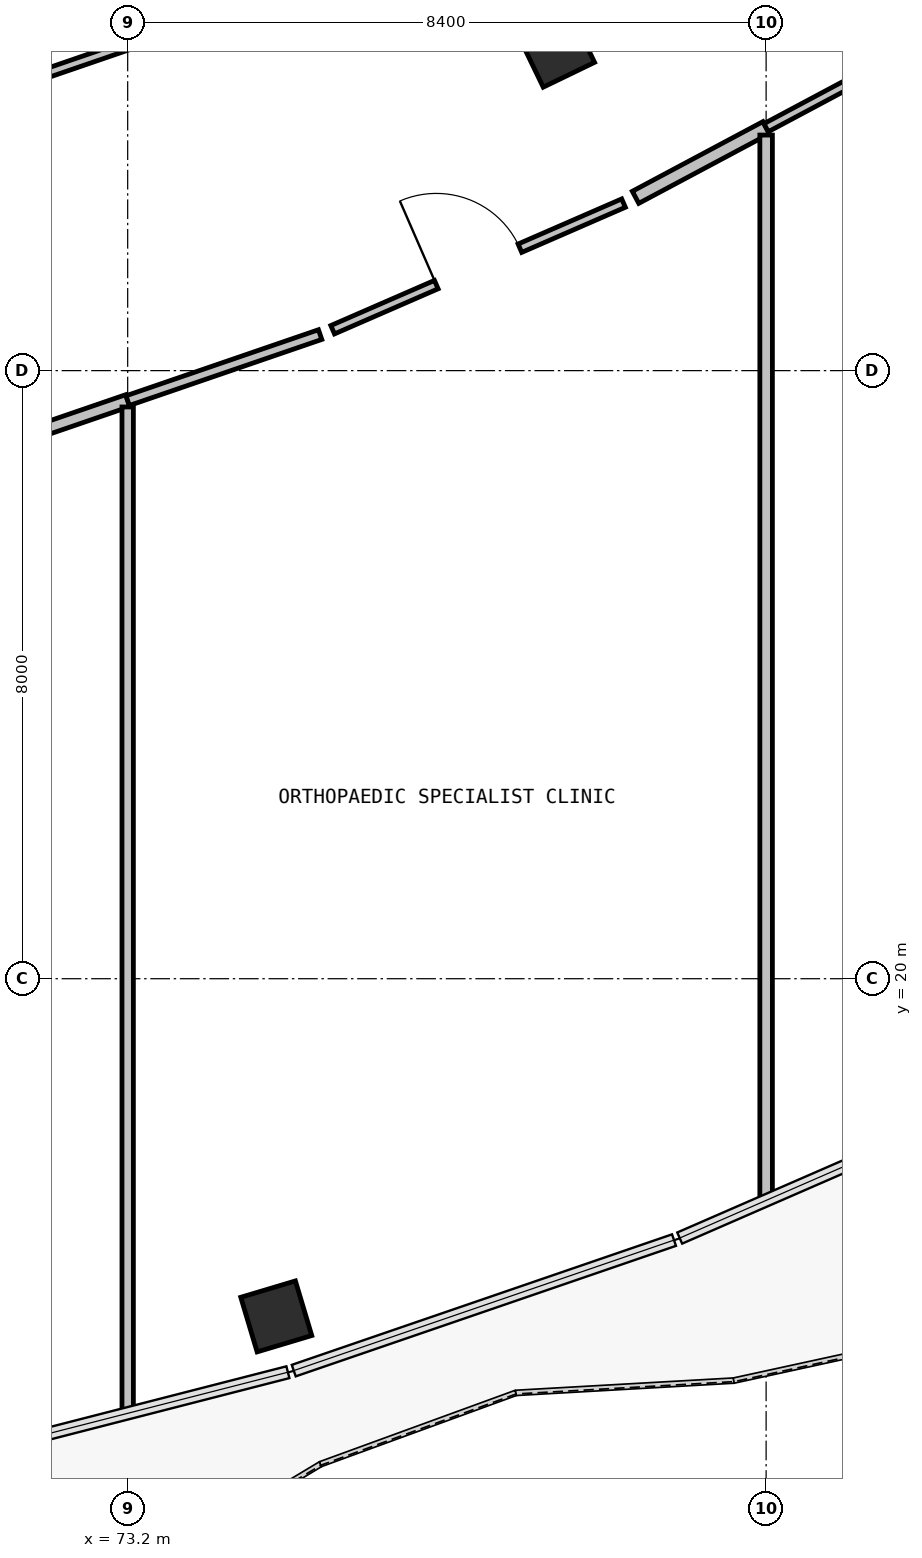
"""IFC4 building model, lengths in metres.
Left out: names, types, materials, properties, quantities, classifications, styles, units other than length and angle.
Written with IfcOpenShell. Run it as: python <this file> out.ifc"""

import sys

from ifc_helpers import new_model, si_unit, direction, frame, frame_2d, origin, origin_2d, place, context, subcontext, project, spatial, rectangle, extrude, element, fill, save


model = new_model("IFC4")
c1 = context("Model", 3, precision=1e-05, world=origin(), true_north=direction((0.0, 1.0)))
c2 = subcontext(c1, "Body", "Model", "MODEL_VIEW")
j1 = project(units=[si_unit("LENGTHUNIT", "METRE"), si_unit("PLANEANGLEUNIT", "RADIAN")], contexts=[c1])
p1 = place(None, origin())
s1 = spatial("IfcSite", under=j1, at=p1, CompositionType="ELEMENT")
p2 = place(p1, origin())
s2 = spatial("IfcBuilding", under=s1, at=p2, CompositionType="ELEMENT")
p3 = place(p2, frame((0.0, 0.0, 5.4)))
s3 = spatial("IfcBuildingStorey", under=s2, at=p3, CompositionType="ELEMENT", Elevation=5.4)
for number, where, z_axis, x_axis in (
    (1, (75.155, 15.557, 0.0), (0.0, 0.0, 1.0), (-0.287, 0.958, 0.0)),
    (2, (78.842, 32.23, 0.0), (0.0, 0.0, 1.0), (-0.435, 0.9, 0.0)),
):
    element("IfcColumn", number, at=place(p3, frame(where, z_axis=z_axis, x_axis=x_axis)), inside=s3, PredefinedType="COLUMN", context=c2, shape_type="SweptSolid", body=[
        extrude(rectangle(XDim=0.75, YDim=0.75, at=origin_2d()), origin(), (0.0, 0.0, 1.0), 4.8),
    ])
p4 = place(p3, frame((71.784, 27.119, 0.0), z_axis=(0.0, 0.0, 1.0), x_axis=(0.945824378739, 0.324678678978, 0.0)))
e3 = element("IfcWall", 3, at=p4, inside=s3, PredefinedType="PARTITIONING", context=c2, shape_type="SweptSolid", body=[
    extrude(rectangle(XDim=1.497, YDim=0.165, at=frame_2d((0.749, 0.0))), origin(), (0.0, 0.0, 1.0), 4.445),
])
p5 = place(p3, frame((73.2, 27.522, 0.0), z_axis=(0.0, 0.0, 1.0), x_axis=(0.0, -1.0, 0.0)))
e4 = element("IfcWall", 4, at=p5, inside=s3, PredefinedType="PARTITIONING", context=c2, shape_type="SweptSolid", body=[
    extrude(rectangle(XDim=13.229, YDim=0.15, at=frame_2d((6.615, 0.0))), origin(), (0.0, 0.0, 1.0), 3.745),
])
p6 = place(p3, frame((73.2, 32.278, 0.0), z_axis=(0.0, 0.0, 1.0), x_axis=(-0.94578196559, -0.324802206836, 0.0)))
e5 = element("IfcWall", 5, at=p6, inside=s3, PredefinedType="PARTITIONING", context=c2, shape_type="SweptSolid", body=[
    extrude(rectangle(XDim=2.926, YDim=0.12, at=frame_2d((1.463, 0.0))), origin(), (0.0, 0.0, 1.0), 4.445),
])
p7 = place(p3, frame((73.2, 27.605, 0.0), z_axis=(0.0, 0.0, 1.0), x_axis=(0.945827570445, 0.324669381042, 0.0)))
e6 = element("IfcWall", 6, at=p7, inside=s3, PredefinedType="PARTITIONING", context=c2, shape_type="SweptSolid", body=[
    extrude(rectangle(XDim=2.677, YDim=0.135, at=frame_2d((1.338, 0.0))), origin(), (0.0, 0.0, 1.0), 4.445),
])
p8 = place(p3, frame((75.897, 28.538, 0.0), z_axis=(0.0, 0.0, 1.0), x_axis=(0.916891425258, 0.399136711276, 0.0)))
e7 = element("IfcWall", 7, at=p8, inside=s3, PredefinedType="PARTITIONING", context=c2, shape_type="SweptSolid", body=[
    extrude(rectangle(XDim=4.174, YDim=0.12, at=frame_2d((2.087, 0.0))), origin(), (0.0, 0.0, 1.0), 4.445),
])
p9 = place(p8, frame((1.487, 0.0, 0.0)))
e8 = element("IfcOpeningElement", 8, at=p9, cuts=e7, PredefinedType="OPENING", context=c2, shape_type="SweptSolid", body=[
    extrude(rectangle(XDim=1.2, YDim=2.15, at=frame_2d((0.6, 1.075))), frame((0.0, 0.07, 0.0), z_axis=(0.0, -1.0, 0.0), x_axis=(1.0, 0.0, 0.0)), (0.0, 0.0, 1.0), 0.14),
])
p10 = place(p3, frame((79.882, 30.28, 0.0), z_axis=(0.0, 0.0, 1.0), x_axis=(0.882408473544, 0.470484097305, 0.0)))
e9 = element("IfcWall", 9, at=p10, inside=s3, PredefinedType="PARTITIONING", context=c2, shape_type="SweptSolid", body=[
    extrude(rectangle(XDim=1.947, YDim=0.18, at=frame_2d((0.974, 0.0))), origin(), (0.0, 0.0, 1.0), 4.445),
])
p11 = place(p3, frame((81.6, 31.099, 0.0), z_axis=(0.0, 0.0, 1.0), x_axis=(0.0, -1.0, 0.0)))
e10 = element("IfcWall", 10, at=p11, inside=s3, PredefinedType="PARTITIONING", context=c2, shape_type="SweptSolid", body=[
    extrude(rectangle(XDim=14.004, YDim=0.165, at=frame_2d((7.002, 0.0))), origin(), (0.0, 0.0, 1.0), 4.445),
])
p12 = place(p3, frame((81.6, 31.196, 0.0), z_axis=(0.0, 0.0, 1.0), x_axis=(0.882365080709, 0.470565472963, 0.0)))
e11 = element("IfcWall", 11, at=p12, inside=s3, PredefinedType="PARTITIONING", context=c2, shape_type="SweptSolid", body=[
    extrude(rectangle(XDim=2.227, YDim=0.12, at=frame_2d((1.113, 0.0))), origin(), (0.0, 0.0, 1.0), 4.445),
])
p13 = place(p9, origin())
e12 = element("IfcDoor", 12, at=p13, inside=s3, OperationType="SINGLE_SWING_LEFT", PredefinedType="DOOR", context=c2, shape_type="SweptSolid", body=[
    extrude(rectangle(XDim=1.2, YDim=2.15, at=frame_2d((0.6, 1.075))), frame((0.0, 0.025, 0.0), z_axis=(0.0, -1.0, 0.0), x_axis=(1.0, 0.0, 0.0)), (0.0, 0.0, 1.0), 0.05),
])
fill(e8, e12)
save(model, sys.argv[1])
